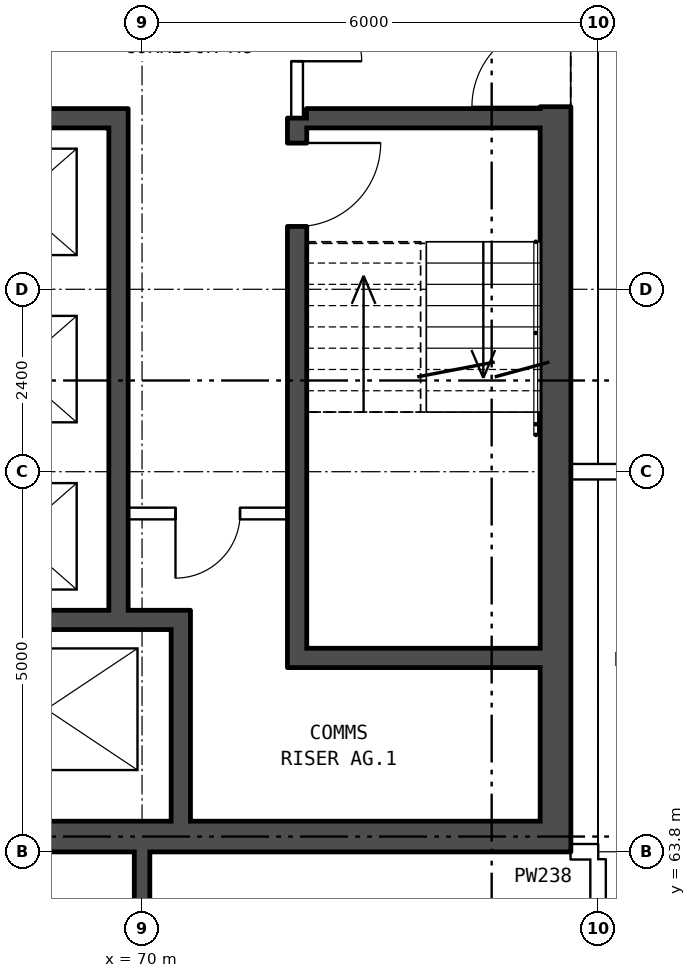
"""IFC4 building model, lengths in metres.
Left out: names, types, materials, properties, quantities, classifications, styles, units other than length and angle.
Written with IfcOpenShell. Run it as: python <this file> out.ifc"""

import sys

from ifc_helpers import new_model, si_unit, direction, frame, frame_2d, origin, place, context, subcontext, project, spatial, rectangle, extrude, element, fill, save


model = new_model("IFC4")
c1 = context("Model", 3, precision=1e-05, world=origin(), true_north=direction((0.0, 1.0)))
c2 = subcontext(c1, "Body", "Model", "MODEL_VIEW")
j1 = project(units=[si_unit("LENGTHUNIT", "METRE"), si_unit("PLANEANGLEUNIT", "RADIAN")], contexts=[c1])
p1 = place(None, origin())
s1 = spatial("IfcSite", under=j1, at=p1, CompositionType="ELEMENT")
p2 = place(p1, origin())
s2 = spatial("IfcBuilding", under=s1, at=p2, CompositionType="ELEMENT")
p3 = place(p2, frame((0.0, 0.0, 227.6)))
s3 = spatial("IfcBuildingStorey", under=s2, at=p3, CompositionType="ELEMENT", Elevation=227.6)
p4 = place(p3, frame((75.44, 63.8, 0.0), z_axis=(0.0, 0.0, 1.0), x_axis=(0.0, 1.0, 0.0)))
e1 = element("IfcWall", 1, at=p4, inside=s3, PredefinedType="SHEAR", context=c2, shape_type="SweptSolid", body=[
    extrude(rectangle(XDim=12.4, YDim=0.4, at=frame_2d((6.2, 0.0))), origin(), (0.0, 0.0, 1.0), 2.85),
])
p5 = place(p4, frame((9.8, 0.0, 0.0)))
e2 = element("IfcOpeningElement", 2, at=p5, cuts=e1, PredefinedType="OPENING", context=c2, shape_type="SweptSolid", body=[
    extrude(rectangle(XDim=1.1, YDim=2.1, at=frame_2d((0.55, 1.05))), frame((0.0, 0.21, 0.0), z_axis=(0.0, -1.0, 0.0), x_axis=(1.0, 0.0, 0.0)), (0.0, 0.0, 1.0), 0.42),
])
p6 = place(p3, frame((67.04, 64.0, 0.0), z_axis=(0.0, 0.0, 1.0), x_axis=(1.0, 0.0, 0.0)))
e3 = element("IfcWall", 3, at=p6, inside=s3, PredefinedType="SHEAR", context=c2, shape_type="SweptSolid", body=[
    extrude(rectangle(XDim=8.2, YDim=0.4, at=frame_2d((4.1, 0.0))), origin(), (0.0, 0.0, 1.0), 2.85),
])
p7 = place(p3, frame((72.165, 66.35, 0.0), z_axis=(0.0, 0.0, 1.0), x_axis=(1.0, 0.0, 0.0)))
e4 = element("IfcWall", 4, at=p7, inside=s3, PredefinedType="SHEAR", context=c2, shape_type="SweptSolid", body=[
    extrude(rectangle(XDim=3.075, YDim=0.25, at=frame_2d((1.538, 0.0))), origin(), (0.0, 0.0, 1.0), 2.85),
])
p8 = place(p3, frame((67.04, 66.85, 0.0), z_axis=(0.0, 0.0, 1.0), x_axis=(1.0, 0.0, 0.0)))
e5 = element("IfcWall", 5, at=p8, inside=s3, PredefinedType="SHEAR", context=c2, shape_type="SweptSolid", body=[
    extrude(rectangle(XDim=3.595, YDim=0.25, at=frame_2d((1.797, 0.0))), origin(), (0.0, 0.0, 1.0), 2.85),
])
p9 = place(p3, frame((69.815, 68.25, 0.0), z_axis=(0.0, 0.0, 1.0), x_axis=(1.0, 0.0, 0.0)))
e6 = element("IfcWall", 6, at=p9, inside=s3, PredefinedType="PARTITIONING", context=c2, shape_type="SweptSolid", body=[
    extrude(rectangle(XDim=2.1, YDim=0.15, at=frame_2d((1.05, 0.0))), origin(), (0.0, 0.0, 1.0), 2.85),
])
p10 = place(p9, frame((0.625, 0.0, 0.0)))
e7 = element("IfcOpeningElement", 7, at=p10, cuts=e6, PredefinedType="OPENING", context=c2, shape_type="SweptSolid", body=[
    extrude(rectangle(XDim=0.85, YDim=2.1, at=frame_2d((0.425, 1.05))), frame((0.0, 0.085, 0.0), z_axis=(0.0, -1.0, 0.0), x_axis=(1.0, 0.0, 0.0)), (0.0, 0.0, 1.0), 0.17),
])
p11 = place(p3, frame((67.04, 73.45, 0.0), z_axis=(0.0, 0.0, 1.0), x_axis=(1.0, 0.0, 0.0)))
e8 = element("IfcWall", 8, at=p11, inside=s3, PredefinedType="SHEAR", context=c2, shape_type="SweptSolid", body=[
    extrude(rectangle(XDim=2.525, YDim=0.25, at=frame_2d((1.262, 0.0))), origin(), (0.0, 0.0, 1.0), 2.85),
])
p12 = place(p3, frame((72.165, 73.45, 0.0), z_axis=(0.0, 0.0, 1.0), x_axis=(1.0, 0.0, 0.0)))
e9 = element("IfcWall", 9, at=p12, inside=s3, PredefinedType="SHEAR", context=c2, shape_type="SweptSolid", body=[
    extrude(rectangle(XDim=3.075, YDim=0.25, at=frame_2d((1.538, 0.0))), origin(), (0.0, 0.0, 1.0), 2.85),
])
p13 = place(p3, frame((69.69, 66.975, 0.0), z_axis=(0.0, 0.0, 1.0), x_axis=(0.0, 1.0, 0.0)))
e10 = element("IfcWall", 10, at=p13, inside=s3, PredefinedType="SHEAR", context=c2, shape_type="SweptSolid", body=[
    extrude(rectangle(XDim=6.6, YDim=0.25, at=frame_2d((3.3, 0.0))), origin(), (0.0, 0.0, 1.0), 2.85),
])
p14 = place(p3, frame((70.51, 64.2, 0.0), z_axis=(0.0, 0.0, 1.0), x_axis=(0.0, 1.0, 0.0)))
e11 = element("IfcWall", 11, at=p14, inside=s3, PredefinedType="SHEAR", context=c2, shape_type="SweptSolid", body=[
    extrude(rectangle(XDim=2.525, YDim=0.25, at=frame_2d((1.263, 0.0))), origin(), (0.0, 0.0, 1.0), 2.85),
])
p15 = place(p3, frame((72.04, 66.225, 0.0), z_axis=(0.0, 0.0, 1.0), x_axis=(0.0, 1.0, 0.0)))
e12 = element("IfcWall", 12, at=p15, inside=s3, PredefinedType="SHEAR", context=c2, shape_type="SweptSolid", body=[
    extrude(rectangle(XDim=7.225, YDim=0.25, at=frame_2d((3.612, 0.0))), origin(), (0.0, 0.0, 1.0), 2.85),
])
p16 = place(p15, frame((5.8, 0.0, 0.0)))
e13 = element("IfcOpeningElement", 13, at=p16, cuts=e12, PredefinedType="OPENING", context=c2, shape_type="SweptSolid", body=[
    extrude(rectangle(XDim=1.1, YDim=2.1, at=frame_2d((0.55, 1.05))), frame((0.0, 0.135, 0.0), z_axis=(0.0, -1.0, 0.0), x_axis=(1.0, 0.0, 0.0)), (0.0, 0.0, 1.0), 0.27),
])
p17 = place(p3, frame((72.04, 73.45, 0.0), z_axis=(0.0, 0.0, 1.0), x_axis=(0.0, 1.0, 0.0)))
e14 = element("IfcWall", 14, at=p17, inside=s3, PredefinedType="PARTITIONING", context=c2, shape_type="SweptSolid", body=[
    extrude(rectangle(XDim=2.35, YDim=0.15, at=frame_2d((1.175, 0.0))), origin(), (0.0, 0.0, 1.0), 2.85),
])
p18 = place(p17, frame((0.75, 0.0, 0.0)))
e15 = element("IfcOpeningElement", 15, at=p18, cuts=e14, PredefinedType="OPENING", context=c2, shape_type="SweptSolid", body=[
    extrude(rectangle(XDim=0.85, YDim=2.1, at=frame_2d((0.425, 1.05))), frame((0.0, 0.085, 0.0), z_axis=(0.0, -1.0, 0.0), x_axis=(1.0, 0.0, 0.0)), (0.0, 0.0, 1.0), 0.17),
])
p19 = place(p3, frame((75.64, 63.8, 0.0), z_axis=(0.0, 0.0, 1.0), x_axis=(1.0, 0.0, 0.0)))
e16 = element("IfcWall", 16, at=p19, inside=s3, PredefinedType="PARTITIONING", context=c2, shape_type="SweptSolid", body=[
    extrude(rectangle(XDim=0.36, YDim=0.2, at=frame_2d((0.18, 0.0))), origin(), (0.0, 0.0, 1.0), 2.85),
])
p20 = place(p3, frame((75.64, 68.8, 0.0), z_axis=(0.0, 0.0, 1.0), x_axis=(1.0, 0.0, 0.0)))
e17 = element("IfcWall", 17, at=p20, inside=s3, PredefinedType="PARTITIONING", context=c2, shape_type="SweptSolid", body=[
    extrude(rectangle(XDim=55.72, YDim=0.2, at=frame_2d((27.86, 0.0))), origin(), (0.0, 0.0, 1.0), 2.85),
])
p21 = place(p20, frame((1.399, 0.0, 0.0)))
e18 = element("IfcOpeningElement", 18, at=p21, cuts=e17, PredefinedType="OPENING", context=c2, shape_type="SweptSolid", body=[
    extrude(rectangle(XDim=1.0, YDim=2.1, at=frame_2d((0.5, 1.05))), frame((0.0, 0.11, 0.0), z_axis=(0.0, -1.0, 0.0), x_axis=(1.0, 0.0, 0.0)), (0.0, 0.0, 1.0), 0.22),
])
p22 = place(p20, frame((12.241, 0.0, 0.0)))
e19 = element("IfcOpeningElement", 19, at=p22, cuts=e17, PredefinedType="OPENING", context=c2, shape_type="SweptSolid", body=[
    extrude(rectangle(XDim=1.0, YDim=2.1, at=frame_2d((0.5, 1.05))), frame((0.0, 0.11, 0.0), z_axis=(0.0, -1.0, 0.0), x_axis=(1.0, 0.0, 0.0)), (0.0, 0.0, 1.0), 0.22),
])
p23 = place(p20, frame((22.553, 0.0, 0.0)))
e20 = element("IfcOpeningElement", 20, at=p23, cuts=e17, PredefinedType="OPENING", context=c2, shape_type="SweptSolid", body=[
    extrude(rectangle(XDim=1.0, YDim=2.1, at=frame_2d((0.5, 1.05))), frame((0.0, 0.11, 0.0), z_axis=(0.0, -1.0, 0.0), x_axis=(1.0, 0.0, 0.0)), (0.0, 0.0, 1.0), 0.22),
])
p24 = place(p20, frame((32.866, 0.0, 0.0)))
e21 = element("IfcOpeningElement", 21, at=p24, cuts=e17, PredefinedType="OPENING", context=c2, shape_type="SweptSolid", body=[
    extrude(rectangle(XDim=1.0, YDim=2.1, at=frame_2d((0.5, 1.05))), frame((0.0, 0.11, 0.0), z_axis=(0.0, -1.0, 0.0), x_axis=(1.0, 0.0, 0.0)), (0.0, 0.0, 1.0), 0.22),
])
p25 = place(p20, frame((36.303, 0.0, 0.0)))
e22 = element("IfcOpeningElement", 22, at=p25, cuts=e17, PredefinedType="OPENING", context=c2, shape_type="SweptSolid", body=[
    extrude(rectangle(XDim=1.0, YDim=2.1, at=frame_2d((0.5, 1.05))), frame((0.0, 0.11, 0.0), z_axis=(0.0, -1.0, 0.0), x_axis=(1.0, 0.0, 0.0)), (0.0, 0.0, 1.0), 0.22),
])
p26 = place(p20, frame((46.616, 0.0, 0.0)))
e23 = element("IfcOpeningElement", 23, at=p26, cuts=e17, PredefinedType="OPENING", context=c2, shape_type="SweptSolid", body=[
    extrude(rectangle(XDim=1.0, YDim=2.1, at=frame_2d((0.5, 1.05))), frame((0.0, 0.11, 0.0), z_axis=(0.0, -1.0, 0.0), x_axis=(1.0, 0.0, 0.0)), (0.0, 0.0, 1.0), 0.22),
])
p27 = place(p20, frame((50.053, 0.0, 0.0)))
e24 = element("IfcOpeningElement", 24, at=p27, cuts=e17, PredefinedType="OPENING", context=c2, shape_type="SweptSolid", body=[
    extrude(rectangle(XDim=1.0, YDim=2.1, at=frame_2d((0.5, 1.05))), frame((0.0, 0.11, 0.0), z_axis=(0.0, -1.0, 0.0), x_axis=(1.0, 0.0, 0.0)), (0.0, 0.0, 1.0), 0.22),
])
p28 = place(p3, frame((70.0, 54.36, 0.0), z_axis=(0.0, 0.0, 1.0), x_axis=(0.0, 1.0, 0.0)))
e25 = element("IfcWall", 25, at=p28, inside=s3, PredefinedType="SOLIDWALL", context=c2, shape_type="SweptSolid", body=[
    extrude(rectangle(XDim=9.44, YDim=0.2, at=frame_2d((4.72, 0.0))), origin(), (0.0, 0.0, 1.0), 2.85),
])
p29 = place(p28, frame((2.32, 0.0, 0.0)))
e26 = element("IfcOpeningElement", 26, at=p29, cuts=e25, PredefinedType="OPENING", context=c2, shape_type="SweptSolid", body=[
    extrude(rectangle(XDim=0.9, YDim=2.1, at=frame_2d((0.45, 1.05))), frame((0.0, 0.11, 0.0), z_axis=(0.0, -1.0, 0.0), x_axis=(1.0, 0.0, 0.0)), (0.0, 0.0, 1.0), 0.22),
])
p30 = place(p28, frame((7.39, 0.0, 0.0)))
e27 = element("IfcOpeningElement", 27, at=p30, cuts=e25, PredefinedType="OPENING", context=c2, shape_type="SweptSolid", body=[
    extrude(rectangle(XDim=0.8, YDim=2.1, at=frame_2d((0.4, 1.05))), frame((0.0, 0.11, 0.0), z_axis=(0.0, -1.0, 0.0), x_axis=(1.0, 0.0, 0.0)), (0.0, 0.0, 1.0), 0.22),
])
p31 = place(p3, frame((76.0, 54.36, 0.0), z_axis=(0.0, 0.0, 1.0), x_axis=(0.0, 1.0, 0.0)))
e28 = element("IfcWall", 28, at=p31, inside=s3, PredefinedType="PARTITIONING", context=c2, shape_type="SweptSolid", body=[
    extrude(rectangle(XDim=9.34, YDim=0.2, at=frame_2d((4.67, 0.0))), origin(), (0.0, 0.0, 1.0), 2.85),
])
p32 = place(p16, frame((1.1, 0.0, 0.0), z_axis=(0.0, 0.0, 1.0), x_axis=(-1.0, 0.0, 0.0)))
e29 = element("IfcDoor", 29, at=p32, inside=s3, OperationType="SINGLE_SWING_LEFT", PredefinedType="DOOR", context=c2, shape_type="SweptSolid", body=[
    extrude(rectangle(XDim=1.1, YDim=2.1, at=frame_2d((0.55, 1.05))), frame((0.0, 0.025, 0.0), z_axis=(0.0, -1.0, 0.0), x_axis=(1.0, 0.0, 0.0)), (0.0, 0.0, 1.0), 0.05),
])
fill(e13, e29)
p33 = place(p10, frame((0.85, 0.0, 0.0), z_axis=(0.0, 0.0, 1.0), x_axis=(-1.0, 0.0, 0.0)))
e30 = element("IfcDoor", 30, at=p33, inside=s3, OperationType="SINGLE_SWING_RIGHT", PredefinedType="DOOR", context=c2, shape_type="SweptSolid", body=[
    extrude(rectangle(XDim=0.85, YDim=2.1, at=frame_2d((0.425, 1.05))), frame((0.0, 0.025, 0.0), z_axis=(0.0, -1.0, 0.0), x_axis=(1.0, 0.0, 0.0)), (0.0, 0.0, 1.0), 0.05),
])
fill(e7, e30)
p34 = place(p18, frame((0.85, 0.0, 0.0), z_axis=(0.0, 0.0, 1.0), x_axis=(-1.0, 0.0, 0.0)))
e31 = element("IfcDoor", 31, at=p34, inside=s3, OperationType="SINGLE_SWING_RIGHT", PredefinedType="DOOR", context=c2, shape_type="SweptSolid", body=[
    extrude(rectangle(XDim=0.85, YDim=2.1, at=frame_2d((0.425, 1.05))), frame((0.0, 0.025, 0.0), z_axis=(0.0, -1.0, 0.0), x_axis=(1.0, 0.0, 0.0)), (0.0, 0.0, 1.0), 0.05),
])
fill(e15, e31)
p35 = place(p5, origin())
e32 = element("IfcDoor", 32, at=p35, inside=s3, OperationType="SINGLE_SWING_LEFT", PredefinedType="DOOR", context=c2, shape_type="SweptSolid", body=[
    extrude(rectangle(XDim=1.1, YDim=2.1, at=frame_2d((0.55, 1.05))), frame((0.0, 0.185, 0.0), z_axis=(0.0, -1.0, 0.0), x_axis=(1.0, 0.0, 0.0)), (0.0, 0.0, 1.0), 0.05),
])
fill(e2, e32)
save(model, sys.argv[1])
